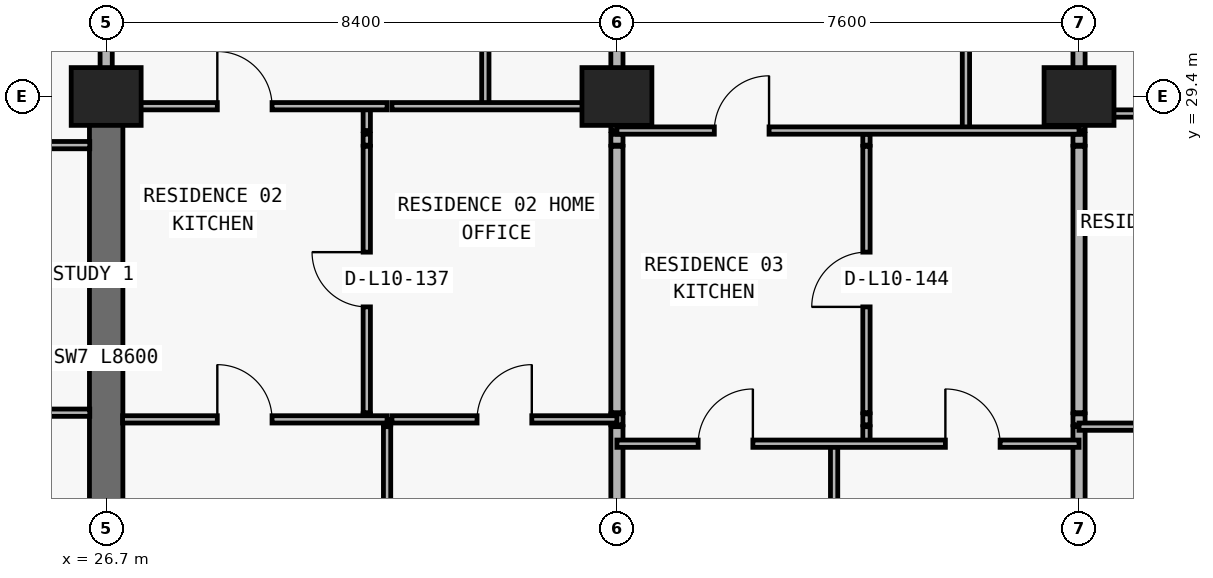
"""IFC4 building model, lengths in metres.
Left out: names, types, materials, properties, quantities, classifications, styles, units other than length and angle.
Written with IfcOpenShell. Run it as: python <this file> out.ifc"""

import sys

from ifc_helpers import new_model, si_unit, direction, frame, frame_2d, origin, origin_2d, place, context, subcontext, project, spatial, rectangle, extrude, element, fill, save


model = new_model("IFC4")
c1 = context("Model", 3, precision=1e-05, world=origin(), true_north=direction((0.0, 1.0)))
c2 = subcontext(c1, "Body", "Model", "MODEL_VIEW")
j1 = project(units=[si_unit("LENGTHUNIT", "METRE"), si_unit("PLANEANGLEUNIT", "RADIAN")], contexts=[c1])
p1 = place(None, origin())
s1 = spatial("IfcSite", under=j1, at=p1, CompositionType="ELEMENT")
p2 = place(p1, origin())
s2 = spatial("IfcBuilding", under=s1, at=p2, CompositionType="ELEMENT")
p3 = place(p2, frame((0.0, 0.0, 43.2)))
s3 = spatial("IfcBuildingStorey", under=s2, at=p3, CompositionType="ELEMENT", Elevation=43.2)
for number, where, z_axis, x_axis in (
    (1, (26.7, 29.4, 0.0), (0.0, 0.0, 1.0), (1.0, 0.0, 0.0)),
    (2, (35.1, 29.4, 0.0), (0.0, 0.0, 1.0), (1.0, 0.0, 0.0)),
    (3, (42.7, 29.4, 0.0), (0.0, 0.0, 1.0), (1.0, 0.0, 0.0)),
):
    element("IfcColumn", number, at=place(p3, frame(where, z_axis=z_axis, x_axis=x_axis)), inside=s3, PredefinedType="COLUMN", context=c2, shape_type="SweptSolid", body=[
        extrude(rectangle(XDim=1.15, YDim=0.95, at=origin_2d()), origin(), (0.0, 0.0, 1.0), 3.05),
    ])
p4 = place(p3, frame((26.7, 20.8, 0.0), z_axis=(0.0, 0.0, 1.0), x_axis=(0.0, 1.0, 0.0)))
e4 = element("IfcWall", 4, at=p4, inside=s3, PredefinedType="SHEAR", context=c2, shape_type="SweptSolid", body=[
    extrude(rectangle(XDim=8.6, YDim=0.55, at=frame_2d((4.3, 0.0))), origin(), (0.0, 0.0, 1.0), 3.05),
])
p5 = place(p3, frame((26.7, 29.405, 0.0), z_axis=(0.0, 0.0, 1.0), x_axis=(0.0, 1.0, 0.0)))
e5 = element("IfcWall", 5, at=p5, inside=s3, PredefinedType="PARTITIONING", context=c2, shape_type="SweptSolid", body=[
    extrude(rectangle(XDim=4.595, YDim=0.2, at=frame_2d((2.297, 0.0))), origin(), (0.0, 0.0, 1.0), 2.335),
])
p6 = place(p3, frame((30.986, 24.09, 0.0), z_axis=(0.0, 0.0, 1.0), x_axis=(0.0, 1.0, 0.0)))
e6 = element("IfcWall", 6, at=p6, inside=s3, PredefinedType="PARTITIONING", context=c2, shape_type="SweptSolid", body=[
    extrude(rectangle(XDim=0.09, YDim=0.12, at=frame_2d((0.045, 0.0))), origin(), (0.0, 0.0, 1.0), 3.05),
])
p7 = place(p3, frame((30.986, 24.2, 0.0), z_axis=(0.0, 0.0, 1.0), x_axis=(0.0, 1.0, 0.0)))
e7 = element("IfcWall", 7, at=p7, inside=s3, PredefinedType="PARTITIONING", context=c2, shape_type="SweptSolid", body=[
    extrude(rectangle(XDim=4.38, YDim=0.12, at=frame_2d((2.19, 0.0))), origin(), (0.0, 0.0, 1.0), 3.05),
])
p8 = place(p7, frame((1.74, 0.0, 0.0)))
e8 = element("IfcOpeningElement", 8, at=p8, cuts=e7, PredefinedType="OPENING", context=c2, shape_type="SweptSolid", body=[
    extrude(rectangle(XDim=0.9, YDim=2.15, at=frame_2d((0.45, 1.075))), frame((0.0, 0.07, 0.0), z_axis=(0.0, -1.0, 0.0), x_axis=(1.0, 0.0, 0.0)), (0.0, 0.0, 1.0), 0.14),
])
p9 = place(p3, frame((30.986, 28.6, 0.0), z_axis=(0.0, 0.0, 1.0), x_axis=(0.0, 1.0, 0.0)))
e9 = element("IfcWall", 9, at=p9, inside=s3, PredefinedType="PARTITIONING", context=c2, shape_type="SweptSolid", body=[
    extrude(rectangle(XDim=0.18, YDim=0.12, at=frame_2d((0.09, 0.0))), origin(), (0.0, 0.0, 1.0), 3.05),
])
p10 = place(p3, frame((30.986, 28.84, 0.0), z_axis=(0.0, 0.0, 1.0), x_axis=(0.0, 1.0, 0.0)))
e10 = element("IfcWall", 10, at=p10, inside=s3, PredefinedType="PARTITIONING", context=c2, shape_type="SweptSolid", body=[
    extrude(rectangle(XDim=0.4, YDim=0.12, at=frame_2d((0.2, 0.0))), origin(), (0.0, 0.0, 1.0), 3.05),
])
p11 = place(p3, frame((31.32, 6.24, 0.0), z_axis=(0.0, 0.0, 1.0), x_axis=(0.0, 1.0, 0.0)))
e11 = element("IfcWall", 11, at=p11, inside=s3, PredefinedType="PARTITIONING", context=c2, shape_type="SweptSolid", body=[
    extrude(rectangle(XDim=17.73, YDim=0.12, at=frame_2d((8.865, 0.0))), origin(), (0.0, 0.0, 1.0), 3.05),
])
p12 = place(p3, frame((31.32, 24.0, 0.0), z_axis=(0.0, 0.0, 1.0), x_axis=(0.0, 1.0, 0.0)))
e12 = element("IfcWall", 12, at=p12, inside=s3, PredefinedType="PARTITIONING", context=c2, shape_type="SweptSolid", body=[
    extrude(rectangle(XDim=0.09, YDim=0.12, at=frame_2d((0.045, 0.0))), origin(), (0.0, 0.0, 1.0), 3.05),
])
p13 = place(p3, frame((32.936, 29.24, 0.0), z_axis=(0.0, 0.0, 1.0), x_axis=(0.0, 1.0, 0.0)))
e13 = element("IfcWall", 13, at=p13, inside=s3, PredefinedType="PARTITIONING", context=c2, shape_type="SweptSolid", body=[
    extrude(rectangle(XDim=4.76, YDim=0.12, at=frame_2d((2.38, 0.0))), origin(), (0.0, 0.0, 1.0), 3.05),
])
p14 = place(p13, frame((1.955, 0.0, 0.0)))
e14 = element("IfcOpeningElement", 14, at=p14, cuts=e13, PredefinedType="OPENING", context=c2, shape_type="SweptSolid", body=[
    extrude(rectangle(XDim=0.85, YDim=2.1, at=frame_2d((0.425, 1.05))), frame((0.0, 0.07, 0.0), z_axis=(0.0, -1.0, 0.0), x_axis=(1.0, 0.0, 0.0)), (0.0, 0.0, 1.0), 0.14),
])
p15 = place(p3, frame((35.1, 6.24, 0.0), z_axis=(0.0, 0.0, 1.0), x_axis=(0.0, 1.0, 0.0)))
e15 = element("IfcWall", 15, at=p15, inside=s3, PredefinedType="PARTITIONING", context=c2, shape_type="SweptSolid", body=[
    extrude(rectangle(XDim=17.73, YDim=0.2, at=frame_2d((8.865, 0.0))), origin(), (0.0, 0.0, 1.0), 2.11),
])
p16 = place(p3, frame((35.1, 24.0, 0.0), z_axis=(0.0, 0.0, 1.0), x_axis=(0.0, 1.0, 0.0)))
e16 = element("IfcWall", 16, at=p16, inside=s3, PredefinedType="PARTITIONING", context=c2, shape_type="SweptSolid", body=[
    extrude(rectangle(XDim=0.18, YDim=0.2, at=frame_2d((0.09, 0.0))), origin(), (0.0, 0.0, 1.0), 2.11),
])
p17 = place(p3, frame((35.1, 24.2, 0.0), z_axis=(0.0, 0.0, 1.0), x_axis=(0.0, 1.0, 0.0)))
e17 = element("IfcWall", 17, at=p17, inside=s3, PredefinedType="PARTITIONING", context=c2, shape_type="SweptSolid", body=[
    extrude(rectangle(XDim=4.38, YDim=0.2, at=frame_2d((2.19, 0.0))), origin(), (0.0, 0.0, 1.0), 2.11),
])
p18 = place(p3, frame((35.1, 28.6, 0.0), z_axis=(0.0, 0.0, 1.0), x_axis=(0.0, 1.0, 0.0)))
e18 = element("IfcWall", 18, at=p18, inside=s3, PredefinedType="PARTITIONING", context=c2, shape_type="SweptSolid", body=[
    extrude(rectangle(XDim=0.18, YDim=0.2, at=frame_2d((0.09, 0.0))), origin(), (0.0, 0.0, 1.0), 2.11),
])
p19 = place(p3, frame((35.1, 28.84, 0.0), z_axis=(0.0, 0.0, 1.0), x_axis=(0.0, 1.0, 0.0)))
e19 = element("IfcWall", 19, at=p19, inside=s3, PredefinedType="PARTITIONING", context=c2, shape_type="SweptSolid", body=[
    extrude(rectangle(XDim=5.16, YDim=0.2, at=frame_2d((2.58, 0.0))), origin(), (0.0, 0.0, 1.0), 2.11),
])
p20 = place(p3, frame((38.672, 6.24, 0.0), z_axis=(0.0, 0.0, 1.0), x_axis=(0.0, 1.0, 0.0)))
e20 = element("IfcWall", 20, at=p20, inside=s3, PredefinedType="PARTITIONING", context=c2, shape_type="SweptSolid", body=[
    extrude(rectangle(XDim=17.45, YDim=0.12, at=frame_2d((8.725, 0.0))), origin(), (0.0, 0.0, 1.0), 3.05),
])
p21 = place(p3, frame((39.204, 23.69, 0.0), z_axis=(0.0, 0.0, 1.0), x_axis=(0.0, 1.0, 0.0)))
e21 = element("IfcWall", 21, at=p21, inside=s3, PredefinedType="PARTITIONING", context=c2, shape_type="SweptSolid", body=[
    extrude(rectangle(XDim=0.28, YDim=0.12, at=frame_2d((0.14, 0.0))), origin(), (0.0, 0.0, 1.0), 3.05),
])
p22 = place(p3, frame((39.204, 24.0, 0.0), z_axis=(0.0, 0.0, 1.0), x_axis=(0.0, 1.0, 0.0)))
e22 = element("IfcWall", 22, at=p22, inside=s3, PredefinedType="PARTITIONING", context=c2, shape_type="SweptSolid", body=[
    extrude(rectangle(XDim=0.18, YDim=0.12, at=frame_2d((0.09, 0.0))), origin(), (0.0, 0.0, 1.0), 3.05),
])
p23 = place(p3, frame((39.204, 24.2, 0.0), z_axis=(0.0, 0.0, 1.0), x_axis=(0.0, 1.0, 0.0)))
e23 = element("IfcWall", 23, at=p23, inside=s3, PredefinedType="PARTITIONING", context=c2, shape_type="SweptSolid", body=[
    extrude(rectangle(XDim=4.38, YDim=0.12, at=frame_2d((2.19, 0.0))), origin(), (0.0, 0.0, 1.0), 3.05),
])
p24 = place(p23, frame((1.74, 0.0, 0.0)))
e24 = element("IfcOpeningElement", 24, at=p24, cuts=e23, PredefinedType="OPENING", context=c2, shape_type="SweptSolid", body=[
    extrude(rectangle(XDim=0.9, YDim=2.15, at=frame_2d((0.45, 1.075))), frame((0.0, 0.07, 0.0), z_axis=(0.0, -1.0, 0.0), x_axis=(1.0, 0.0, 0.0)), (0.0, 0.0, 1.0), 0.14),
])
p25 = place(p3, frame((39.204, 28.6, 0.0), z_axis=(0.0, 0.0, 1.0), x_axis=(0.0, 1.0, 0.0)))
e25 = element("IfcWall", 25, at=p25, inside=s3, PredefinedType="PARTITIONING", context=c2, shape_type="SweptSolid", body=[
    extrude(rectangle(XDim=0.18, YDim=0.12, at=frame_2d((0.09, 0.0))), origin(), (0.0, 0.0, 1.0), 3.05),
])
p26 = place(p3, frame((40.84, 28.84, 0.0), z_axis=(0.0, 0.0, 1.0), x_axis=(0.0, 1.0, 0.0)))
e26 = element("IfcWall", 26, at=p26, inside=s3, PredefinedType="PARTITIONING", context=c2, shape_type="SweptSolid", body=[
    extrude(rectangle(XDim=5.16, YDim=0.12, at=frame_2d((2.58, 0.0))), origin(), (0.0, 0.0, 1.0), 3.05),
])
p27 = place(p26, frame((2.155, 0.0, 0.0)))
e27 = element("IfcOpeningElement", 27, at=p27, cuts=e26, PredefinedType="OPENING", context=c2, shape_type="SweptSolid", body=[
    extrude(rectangle(XDim=0.85, YDim=2.1, at=frame_2d((0.425, 1.05))), frame((0.0, 0.07, 0.0), z_axis=(0.0, -1.0, 0.0), x_axis=(1.0, 0.0, 0.0)), (0.0, 0.0, 1.0), 0.14),
])
p28 = place(p3, frame((42.7, 6.24, 0.0), z_axis=(0.0, 0.0, 1.0), x_axis=(0.0, 1.0, 0.0)))
e28 = element("IfcWall", 28, at=p28, inside=s3, PredefinedType="PARTITIONING", context=c2, shape_type="SweptSolid", body=[
    extrude(rectangle(XDim=17.73, YDim=0.2, at=frame_2d((8.865, 0.0))), origin(), (0.0, 0.0, 1.0), 2.11),
])
p29 = place(p3, frame((42.7, 24.0, 0.0), z_axis=(0.0, 0.0, 1.0), x_axis=(0.0, 1.0, 0.0)))
e29 = element("IfcWall", 29, at=p29, inside=s3, PredefinedType="PARTITIONING", context=c2, shape_type="SweptSolid", body=[
    extrude(rectangle(XDim=0.18, YDim=0.2, at=frame_2d((0.09, 0.0))), origin(), (0.0, 0.0, 1.0), 2.11),
])
p30 = place(p3, frame((42.7, 24.2, 0.0), z_axis=(0.0, 0.0, 1.0), x_axis=(0.0, 1.0, 0.0)))
e30 = element("IfcWall", 30, at=p30, inside=s3, PredefinedType="PARTITIONING", context=c2, shape_type="SweptSolid", body=[
    extrude(rectangle(XDim=4.38, YDim=0.2, at=frame_2d((2.19, 0.0))), origin(), (0.0, 0.0, 1.0), 2.11),
])
p31 = place(p3, frame((42.7, 28.6, 0.0), z_axis=(0.0, 0.0, 1.0), x_axis=(0.0, 1.0, 0.0)))
e31 = element("IfcWall", 31, at=p31, inside=s3, PredefinedType="PARTITIONING", context=c2, shape_type="SweptSolid", body=[
    extrude(rectangle(XDim=0.18, YDim=0.2, at=frame_2d((0.09, 0.0))), origin(), (0.0, 0.0, 1.0), 2.11),
])
p32 = place(p3, frame((42.7, 28.84, 0.0), z_axis=(0.0, 0.0, 1.0), x_axis=(0.0, 1.0, 0.0)))
e32 = element("IfcWall", 32, at=p32, inside=s3, PredefinedType="PARTITIONING", context=c2, shape_type="SweptSolid", body=[
    extrude(rectangle(XDim=5.16, YDim=0.2, at=frame_2d((2.58, 0.0))), origin(), (0.0, 0.0, 1.0), 2.11),
])
p33 = place(p3, frame((35.1, 23.69, 0.0), z_axis=(0.0, 0.0, 1.0), x_axis=(1.0, 0.0, 0.0)))
e33 = element("IfcWall", 33, at=p33, inside=s3, PredefinedType="PARTITIONING", context=c2, shape_type="SweptSolid", body=[
    extrude(rectangle(XDim=7.6, YDim=0.12, at=frame_2d((3.8, 0.0))), origin(), (0.0, 0.0, 1.0), 3.05),
])
p34 = place(p33, frame((1.336, 0.0, 0.0)))
e34 = element("IfcOpeningElement", 34, at=p34, cuts=e33, PredefinedType="OPENING", context=c2, shape_type="SweptSolid", body=[
    extrude(rectangle(XDim=0.9, YDim=2.15, at=frame_2d((0.45, 1.075))), frame((0.0, 0.07, 0.0), z_axis=(0.0, -1.0, 0.0), x_axis=(1.0, 0.0, 0.0)), (0.0, 0.0, 1.0), 0.14),
])
p35 = place(p33, frame((5.402, 0.0, 0.0)))
e35 = element("IfcOpeningElement", 35, at=p35, cuts=e33, PredefinedType="OPENING", context=c2, shape_type="SweptSolid", body=[
    extrude(rectangle(XDim=0.9, YDim=2.15, at=frame_2d((0.45, 1.075))), frame((0.0, 0.07, 0.0), z_axis=(0.0, -1.0, 0.0), x_axis=(1.0, 0.0, 0.0)), (0.0, 0.0, 1.0), 0.14),
])
p36 = place(p3, frame((42.7, 23.97, 0.0), z_axis=(0.0, 0.0, 1.0), x_axis=(1.0, 0.0, 0.0)))
e36 = element("IfcWall", 36, at=p36, inside=s3, PredefinedType="PARTITIONING", context=c2, shape_type="SweptSolid", body=[
    extrude(rectangle(XDim=8.13, YDim=0.12, at=frame_2d((4.065, 0.0))), origin(), (0.0, 0.0, 1.0), 3.05),
])
p37 = place(p36, frame((1.86, 0.0, 0.0)))
e37 = element("IfcOpeningElement", 37, at=p37, cuts=e36, PredefinedType="OPENING", context=c2, shape_type="SweptSolid", body=[
    extrude(rectangle(XDim=0.9, YDim=2.15, at=frame_2d((0.45, 1.075))), frame((0.0, 0.07, 0.0), z_axis=(0.0, -1.0, 0.0), x_axis=(1.0, 0.0, 0.0)), (0.0, 0.0, 1.0), 0.14),
])
p38 = place(p36, frame((6.008, 0.0, 0.0)))
e38 = element("IfcOpeningElement", 38, at=p38, cuts=e36, PredefinedType="OPENING", context=c2, shape_type="SweptSolid", body=[
    extrude(rectangle(XDim=0.9, YDim=2.15, at=frame_2d((0.45, 1.075))), frame((0.0, 0.07, 0.0), z_axis=(0.0, -1.0, 0.0), x_axis=(1.0, 0.0, 0.0)), (0.0, 0.0, 1.0), 0.14),
])
p39 = place(p3, frame((26.97, 24.09, 0.0), z_axis=(0.0, 0.0, 1.0), x_axis=(1.0, 0.0, 0.0)))
e39 = element("IfcWall", 39, at=p39, inside=s3, PredefinedType="PARTITIONING", context=c2, shape_type="SweptSolid", body=[
    extrude(rectangle(XDim=4.35, YDim=0.12, at=frame_2d((2.175, 0.0))), origin(), (0.0, 0.0, 1.0), 3.05),
])
p40 = place(p39, frame((1.558, 0.0, 0.0)))
e40 = element("IfcOpeningElement", 40, at=p40, cuts=e39, PredefinedType="OPENING", context=c2, shape_type="SweptSolid", body=[
    extrude(rectangle(XDim=0.9, YDim=2.15, at=frame_2d((0.45, 1.075))), frame((0.0, 0.07, 0.0), z_axis=(0.0, -1.0, 0.0), x_axis=(1.0, 0.0, 0.0)), (0.0, 0.0, 1.0), 0.14),
])
p41 = place(p3, frame((31.4, 24.09, 0.0), z_axis=(0.0, 0.0, 1.0), x_axis=(1.0, 0.0, 0.0)))
e41 = element("IfcWall", 41, at=p41, inside=s3, PredefinedType="PARTITIONING", context=c2, shape_type="SweptSolid", body=[
    extrude(rectangle(XDim=3.7, YDim=0.12, at=frame_2d((1.85, 0.0))), origin(), (0.0, 0.0, 1.0), 3.05),
])
p42 = place(p41, frame((1.4, 0.0, 0.0)))
e42 = element("IfcOpeningElement", 42, at=p42, cuts=e41, PredefinedType="OPENING", context=c2, shape_type="SweptSolid", body=[
    extrude(rectangle(XDim=0.9, YDim=2.15, at=frame_2d((0.45, 1.075))), frame((0.0, 0.07, 0.0), z_axis=(0.0, -1.0, 0.0), x_axis=(1.0, 0.0, 0.0)), (0.0, 0.0, 1.0), 0.14),
])
p43 = place(p3, frame((18.305, 24.2, 0.0), z_axis=(0.0, 0.0, 1.0), x_axis=(1.0, 0.0, 0.0)))
e43 = element("IfcWall", 43, at=p43, inside=s3, PredefinedType="PARTITIONING", context=c2, shape_type="SweptSolid", body=[
    extrude(rectangle(XDim=8.125, YDim=0.12, at=frame_2d((4.062, 0.0))), origin(), (0.0, 0.0, 1.0), 3.05),
])
p44 = place(p43, frame((3.613, 0.0, 0.0)))
e44 = element("IfcOpeningElement", 44, at=p44, cuts=e43, PredefinedType="OPENING", context=c2, shape_type="SweptSolid", body=[
    extrude(rectangle(XDim=0.9, YDim=2.15, at=frame_2d((0.45, 1.075))), frame((0.0, 0.07, 0.0), z_axis=(0.0, -1.0, 0.0), x_axis=(1.0, 0.0, 0.0)), (0.0, 0.0, 1.0), 0.14),
])
p45 = place(p3, frame((18.3, 28.6, 0.0), z_axis=(0.0, 0.0, 1.0), x_axis=(1.0, 0.0, 0.0)))
e45 = element("IfcWall", 45, at=p45, inside=s3, PredefinedType="PARTITIONING", context=c2, shape_type="SweptSolid", body=[
    extrude(rectangle(XDim=8.13, YDim=0.12, at=frame_2d((4.065, 0.0))), origin(), (0.0, 0.0, 1.0), 3.05),
])
p46 = place(p45, frame((2.861, 0.0, 0.0)))
e46 = element("IfcOpeningElement", 46, at=p46, cuts=e45, PredefinedType="OPENING", context=c2, shape_type="SweptSolid", body=[
    extrude(rectangle(XDim=0.9, YDim=2.15, at=frame_2d((0.45, 1.075))), frame((0.0, 0.07, 0.0), z_axis=(0.0, -1.0, 0.0), x_axis=(1.0, 0.0, 0.0)), (0.0, 0.0, 1.0), 0.14),
])
p47 = place(p3, frame((35.1, 28.84, 0.0), z_axis=(0.0, 0.0, 1.0), x_axis=(1.0, 0.0, 0.0)))
e47 = element("IfcWall", 47, at=p47, inside=s3, PredefinedType="PARTITIONING", context=c2, shape_type="SweptSolid", body=[
    extrude(rectangle(XDim=7.6, YDim=0.12, at=frame_2d((3.8, 0.0))), origin(), (0.0, 0.0, 1.0), 3.05),
])
p48 = place(p47, frame((1.602, 0.0, 0.0)))
e48 = element("IfcOpeningElement", 48, at=p48, cuts=e47, PredefinedType="OPENING", context=c2, shape_type="SweptSolid", body=[
    extrude(rectangle(XDim=0.9, YDim=2.15, at=frame_2d((0.45, 1.075))), frame((0.0, 0.07, 0.0), z_axis=(0.0, -1.0, 0.0), x_axis=(1.0, 0.0, 0.0)), (0.0, 0.0, 1.0), 0.14),
])
p49 = place(p3, frame((42.7, 29.12, 0.0), z_axis=(0.0, 0.0, 1.0), x_axis=(1.0, 0.0, 0.0)))
e49 = element("IfcWall", 49, at=p49, inside=s3, PredefinedType="PARTITIONING", context=c2, shape_type="SweptSolid", body=[
    extrude(rectangle(XDim=8.13, YDim=0.12, at=frame_2d((4.065, 0.0))), origin(), (0.0, 0.0, 1.0), 2.11),
])
p50 = place(p49, frame((1.943, 0.0, 0.0)))
e50 = element("IfcOpeningElement", 50, at=p50, cuts=e49, PredefinedType="OPENING", context=c2, shape_type="SweptSolid", body=[
    extrude(rectangle(XDim=0.9, YDim=2.06, at=frame_2d((0.45, 1.03))), frame((0.0, 0.07, 0.0), z_axis=(0.0, -1.0, 0.0), x_axis=(1.0, 0.0, 0.0)), (0.0, 0.0, 1.0), 0.14),
])
p51 = place(p3, frame((26.97, 29.24, 0.0), z_axis=(0.0, 0.0, 1.0), x_axis=(1.0, 0.0, 0.0)))
e51 = element("IfcWall", 51, at=p51, inside=s3, PredefinedType="PARTITIONING", context=c2, shape_type="SweptSolid", body=[
    extrude(rectangle(XDim=4.35, YDim=0.12, at=frame_2d((2.175, 0.0))), origin(), (0.0, 0.0, 1.0), 2.11),
])
p52 = place(p51, frame((1.558, 0.0, 0.0)))
e52 = element("IfcOpeningElement", 52, at=p52, cuts=e51, PredefinedType="OPENING", context=c2, shape_type="SweptSolid", body=[
    extrude(rectangle(XDim=0.9, YDim=2.06, at=frame_2d((0.45, 1.03))), frame((0.0, 0.07, 0.0), z_axis=(0.0, -1.0, 0.0), x_axis=(1.0, 0.0, 0.0)), (0.0, 0.0, 1.0), 0.14),
])
p53 = place(p3, frame((31.4, 29.24, 0.0), z_axis=(0.0, 0.0, 1.0), x_axis=(1.0, 0.0, 0.0)))
e53 = element("IfcWall", 53, at=p53, inside=s3, PredefinedType="PARTITIONING", context=c2, shape_type="SweptSolid", body=[
    extrude(rectangle(XDim=3.7, YDim=0.12, at=frame_2d((1.85, 0.0))), origin(), (0.0, 0.0, 1.0), 2.11),
])
p54 = place(p52, origin())
e54 = element("IfcDoor", 54, at=p54, inside=s3, OperationType="SINGLE_SWING_LEFT", PredefinedType="DOOR", context=c2, shape_type="SweptSolid", body=[
    extrude(rectangle(XDim=0.9, YDim=2.06, at=frame_2d((0.45, 1.03))), frame((0.0, 0.025, 0.0), z_axis=(0.0, -1.0, 0.0), x_axis=(1.0, 0.0, 0.0)), (0.0, 0.0, 1.0), 0.05),
])
fill(e52, e54)
p55 = place(p8, origin())
e55 = element("IfcDoor", 55, at=p55, inside=s3, OperationType="SINGLE_SWING_RIGHT", PredefinedType="DOOR", context=c2, shape_type="SweptSolid", body=[
    extrude(rectangle(XDim=0.9, YDim=2.15, at=frame_2d((0.45, 1.075))), frame((0.0, 0.025, 0.0), z_axis=(0.0, -1.0, 0.0), x_axis=(1.0, 0.0, 0.0)), (0.0, 0.0, 1.0), 0.05),
])
fill(e8, e55)
p56 = place(p40, origin())
e56 = element("IfcDoor", 56, at=p56, inside=s3, OperationType="SINGLE_SWING_LEFT", PredefinedType="DOOR", context=c2, shape_type="SweptSolid", body=[
    extrude(rectangle(XDim=0.9, YDim=2.15, at=frame_2d((0.45, 1.075))), frame((0.0, 0.025, 0.0), z_axis=(0.0, -1.0, 0.0), x_axis=(1.0, 0.0, 0.0)), (0.0, 0.0, 1.0), 0.05),
])
fill(e40, e56)
p57 = place(p42, origin())
e57 = element("IfcDoor", 57, at=p57, inside=s3, OperationType="SINGLE_SWING_RIGHT", PredefinedType="DOOR", context=c2, shape_type="SweptSolid", body=[
    extrude(rectangle(XDim=0.9, YDim=2.15, at=frame_2d((0.45, 1.075))), frame((0.0, 0.025, 0.0), z_axis=(0.0, -1.0, 0.0), x_axis=(1.0, 0.0, 0.0)), (0.0, 0.0, 1.0), 0.05),
])
fill(e42, e57)
p58 = place(p48, origin())
e58 = element("IfcDoor", 58, at=p58, inside=s3, OperationType="SINGLE_SWING_RIGHT", PredefinedType="DOOR", context=c2, shape_type="SweptSolid", body=[
    extrude(rectangle(XDim=0.9, YDim=2.15, at=frame_2d((0.45, 1.075))), frame((0.0, 0.025, 0.0), z_axis=(0.0, -1.0, 0.0), x_axis=(1.0, 0.0, 0.0)), (0.0, 0.0, 1.0), 0.05),
])
fill(e48, e58)
p59 = place(p24, origin())
e59 = element("IfcDoor", 59, at=p59, inside=s3, OperationType="SINGLE_SWING_LEFT", PredefinedType="DOOR", context=c2, shape_type="SweptSolid", body=[
    extrude(rectangle(XDim=0.9, YDim=2.15, at=frame_2d((0.45, 1.075))), frame((0.0, 0.025, 0.0), z_axis=(0.0, -1.0, 0.0), x_axis=(1.0, 0.0, 0.0)), (0.0, 0.0, 1.0), 0.05),
])
fill(e24, e59)
p60 = place(p34, origin())
e60 = element("IfcDoor", 60, at=p60, inside=s3, OperationType="SINGLE_SWING_RIGHT", PredefinedType="DOOR", context=c2, shape_type="SweptSolid", body=[
    extrude(rectangle(XDim=0.9, YDim=2.15, at=frame_2d((0.45, 1.075))), frame((0.0, 0.025, 0.0), z_axis=(0.0, -1.0, 0.0), x_axis=(1.0, 0.0, 0.0)), (0.0, 0.0, 1.0), 0.05),
])
fill(e34, e60)
p61 = place(p35, origin())
e61 = element("IfcDoor", 61, at=p61, inside=s3, OperationType="SINGLE_SWING_LEFT", PredefinedType="DOOR", context=c2, shape_type="SweptSolid", body=[
    extrude(rectangle(XDim=0.9, YDim=2.15, at=frame_2d((0.45, 1.075))), frame((0.0, 0.025, 0.0), z_axis=(0.0, -1.0, 0.0), x_axis=(1.0, 0.0, 0.0)), (0.0, 0.0, 1.0), 0.05),
])
fill(e35, e61)
save(model, sys.argv[1])
